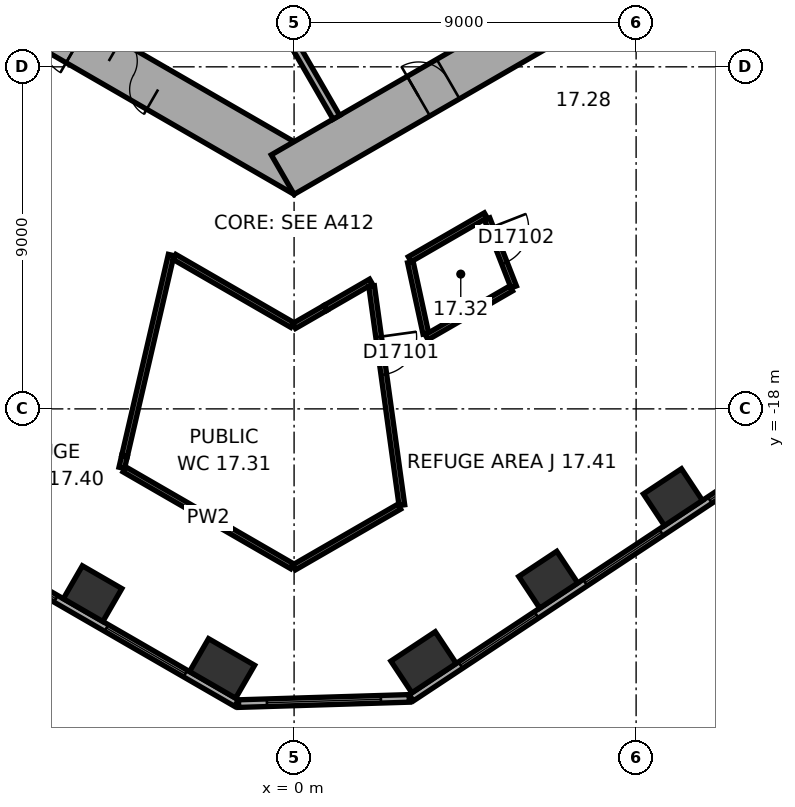
"""IFC4 building model, lengths in metres.
Left out: names, types, materials, properties, quantities, classifications, styles, units other than length and angle.
Written with IfcOpenShell. Run it as: python <this file> out.ifc"""

import sys

from ifc_helpers import new_model, si_unit, direction, frame, frame_2d, origin, origin_2d, place, context, subcontext, project, spatial, rectangle, extrude, element, fill, save


model = new_model("IFC4")
c1 = context("Model", 3, precision=1e-05, world=origin(), true_north=direction((0.0, 1.0)))
c2 = subcontext(c1, "Body", "Model", "MODEL_VIEW")
j1 = project(units=[si_unit("LENGTHUNIT", "METRE"), si_unit("PLANEANGLEUNIT", "RADIAN")], contexts=[c1])
p1 = place(None, origin())
s1 = spatial("IfcSite", under=j1, at=p1, CompositionType="ELEMENT")
p2 = place(p1, origin())
s2 = spatial("IfcBuilding", under=s1, at=p2, CompositionType="ELEMENT")
p3 = place(p2, frame((0.0, 0.0, 77.0)))
s3 = spatial("IfcBuildingStorey", under=s2, at=p3, CompositionType="ELEMENT", Elevation=77.0)
p4 = place(p3, frame((-5.302, -22.862, 0.0), z_axis=(0.0, 0.0, 1.0), x_axis=(0.866025403784, -0.5, 0.0)))
e1 = element("IfcColumn", 1, at=p4, inside=s3, PredefinedType="COLUMN", context=c2, shape_type="SweptSolid", body=[
    extrude(rectangle(XDim=1.2, YDim=1.0, at=origin_2d()), origin(), (0.0, 0.0, 1.0), 6.6),
])
for number, where, z_axis, x_axis in (
    (2, (-1.895, -24.829, 0.0), (0.0, 0.0, 1.0), (0.866, -0.5, 0.0)),
    (3, (3.407, -24.667, 0.0), (0.0, 0.0, 1.0), (0.834, 0.552, 0.0)),
):
    element("IfcColumn", number, at=place(p3, frame(where, z_axis=z_axis, x_axis=x_axis)), inside=s3, PredefinedType="COLUMN", context=c2, shape_type="SweptSolid", body=[
        extrude(rectangle(XDim=1.4, YDim=1.0, at=origin_2d()), origin(), (0.0, 0.0, 1.0), 6.6),
    ])
for number, where, z_axis, x_axis in (
    (4, (6.688, -22.496, 0.0), (0.0, 0.0, 1.0), (0.834, 0.552, 0.0)),
    (5, (9.969, -20.324, 0.0), (0.0, 0.0, 1.0), (0.834, 0.552, 0.0)),
):
    element("IfcColumn", number, at=place(p3, frame(where, z_axis=z_axis, x_axis=x_axis)), inside=s3, PredefinedType="COLUMN", context=c2, shape_type="SweptSolid", body=[
        extrude(rectangle(XDim=1.2, YDim=1.0, at=origin_2d()), origin(), (0.0, 0.0, 1.0), 6.6),
    ])
p5 = place(p3, frame((-10.4, -5.658, 0.0), z_axis=(0.0, 0.0, 1.0), x_axis=(0.866021384402, -0.500006961711, 0.0)))
e6 = element("IfcWall", 6, at=p5, inside=s3, PredefinedType="SHEAR", context=c2, shape_type="SweptSolid", body=[
    extrude(rectangle(XDim=12.355, YDim=1.2, at=frame_2d((6.178, 0.0))), origin(), (0.0, 0.0, 1.0), 6.6),
])
p6 = place(p5, frame((6.378, 0.0, 0.0)))
e7 = element("IfcOpeningElement", 7, at=p6, cuts=e6, PredefinedType="OPENING", context=c2, shape_type="SweptSolid", body=[
    extrude(rectangle(XDim=1.5, YDim=2.1, at=frame_2d((0.75, 1.05))), frame((0.0, 0.61, 0.0), z_axis=(0.0, -1.0, 0.0), x_axis=(1.0, 0.0, 0.0)), (0.0, 0.0, 1.0), 1.22),
])
p7 = place(p5, frame((1.928, 0.0, 0.0)))
e8 = element("IfcOpeningElement", 8, at=p7, cuts=e6, PredefinedType="OPENING", context=c2, shape_type="SweptSolid", body=[
    extrude(rectangle(XDim=0.9, YDim=2.1, at=frame_2d((0.45, 1.05))), frame((0.0, 0.61, 0.0), z_axis=(0.0, -1.0, 0.0), x_axis=(1.0, 0.0, 0.0)), (0.0, 0.0, 1.0), 1.22),
])
p8 = place(p5, frame((4.528, 0.0, 0.0)))
e9 = element("IfcOpeningElement", 9, at=p8, cuts=e6, PredefinedType="OPENING", context=c2, shape_type="SweptSolid", body=[
    extrude(rectangle(XDim=0.9, YDim=2.1, at=frame_2d((0.45, 1.05))), frame((0.0, 0.61, 0.0), z_axis=(0.0, -1.0, 0.0), x_axis=(1.0, 0.0, 0.0)), (0.0, 0.0, 1.0), 1.22),
])
p9 = place(p3, frame((-0.3, -11.836, 0.0), z_axis=(0.0, 0.0, 1.0), x_axis=(0.866021384402, 0.500006961711, 0.0)))
e10 = element("IfcWall", 10, at=p9, inside=s3, PredefinedType="SHEAR", context=c2, shape_type="SweptSolid", body=[
    extrude(rectangle(XDim=12.355, YDim=1.2, at=frame_2d((6.178, 0.0))), origin(), (0.0, 0.0, 1.0), 6.6),
])
p10 = place(p9, frame((4.128, 0.0, 0.0)))
e11 = element("IfcOpeningElement", 11, at=p10, cuts=e10, PredefinedType="OPENING", context=c2, shape_type="SweptSolid", body=[
    extrude(rectangle(XDim=0.9, YDim=2.1, at=frame_2d((0.45, 1.05))), frame((0.0, 0.61, 0.0), z_axis=(0.0, -1.0, 0.0), x_axis=(1.0, 0.0, 0.0)), (0.0, 0.0, 1.0), 1.22),
])
p11 = place(p9, frame((7.928, 0.0, 0.0)))
e12 = element("IfcOpeningElement", 12, at=p11, cuts=e10, PredefinedType="OPENING", context=c2, shape_type="SweptSolid", body=[
    extrude(rectangle(XDim=1.1, YDim=2.1, at=frame_2d((0.55, 1.05))), frame((0.0, 0.61, 0.0), z_axis=(0.0, -1.0, 0.0), x_axis=(1.0, 0.0, 0.0)), (0.0, 0.0, 1.0), 1.22),
])
p12 = place(p3, frame((-19.914, -15.119, 0.0), z_axis=(0.0, 0.0, 1.0), x_axis=(0.866025418898, -0.499999973822, 0.0)))
e13 = element("IfcWall", 13, at=p12, inside=s3, PredefinedType="STANDARD", context=c2, shape_type="SweptSolid", body=[
    extrude(rectangle(XDim=21.246, YDim=0.2, at=frame_2d((10.623, 0.0))), origin(), (0.0, 0.0, 1.0), 6.6),
])
p13 = place(p12, frame((1.555, 0.0, 0.8)))
e14 = element("IfcOpeningElement", 14, at=p13, cuts=e13, PredefinedType="OPENING", context=c2, shape_type="SweptSolid", body=[
    extrude(rectangle(XDim=2.4, YDim=4.2, at=frame_2d((1.2, 2.1))), frame((0.0, 0.11, 0.0), z_axis=(0.0, -1.0, 0.0), x_axis=(1.0, 0.0, 0.0)), (0.0, 0.0, 1.0), 0.22),
])
p14 = place(p12, frame((5.489, 0.0, 0.8)))
e15 = element("IfcOpeningElement", 15, at=p14, cuts=e13, PredefinedType="OPENING", context=c2, shape_type="SweptSolid", body=[
    extrude(rectangle(XDim=2.4, YDim=4.2, at=frame_2d((1.2, 2.1))), frame((0.0, 0.11, 0.0), z_axis=(0.0, -1.0, 0.0), x_axis=(1.0, 0.0, 0.0)), (0.0, 0.0, 1.0), 0.22),
])
p15 = place(p12, frame((9.424, 0.0, 0.8)))
e16 = element("IfcOpeningElement", 16, at=p15, cuts=e13, PredefinedType="OPENING", context=c2, shape_type="SweptSolid", body=[
    extrude(rectangle(XDim=2.4, YDim=4.2, at=frame_2d((1.2, 2.1))), frame((0.0, 0.11, 0.0), z_axis=(0.0, -1.0, 0.0), x_axis=(1.0, 0.0, 0.0)), (0.0, 0.0, 1.0), 0.22),
])
p16 = place(p12, frame((13.358, 0.0, 0.8)))
e17 = element("IfcOpeningElement", 17, at=p16, cuts=e13, PredefinedType="OPENING", context=c2, shape_type="SweptSolid", body=[
    extrude(rectangle(XDim=2.4, YDim=4.2, at=frame_2d((1.2, 2.1))), frame((0.0, 0.11, 0.0), z_axis=(0.0, -1.0, 0.0), x_axis=(1.0, 0.0, 0.0)), (0.0, 0.0, 1.0), 0.22),
])
p17 = place(p12, frame((17.293, 0.0, 0.8)))
e18 = element("IfcOpeningElement", 18, at=p17, cuts=e13, PredefinedType="OPENING", context=c2, shape_type="SweptSolid", body=[
    extrude(rectangle(XDim=2.4, YDim=4.2, at=frame_2d((1.2, 2.1))), frame((0.0, 0.11, 0.0), z_axis=(0.0, -1.0, 0.0), x_axis=(1.0, 0.0, 0.0)), (0.0, 0.0, 1.0), 0.22),
])
p18 = place(p3, frame((-1.461, -25.755, 0.0), z_axis=(0.0, 0.0, 1.0), x_axis=(0.999533823446, 0.030530898895, 0.0)))
e19 = element("IfcWall", 19, at=p18, inside=s3, PredefinedType="STANDARD", context=c2, shape_type="SweptSolid", body=[
    extrude(rectangle(XDim=4.494, YDim=0.2, at=frame_2d((2.247, 0.0))), origin(), (0.0, 0.0, 1.0), 6.6),
])
p19 = place(p18, frame((0.747, 0.0, 0.8)))
e20 = element("IfcOpeningElement", 20, at=p19, cuts=e19, PredefinedType="OPENING", context=c2, shape_type="SweptSolid", body=[
    extrude(rectangle(XDim=3.0, YDim=4.2, at=frame_2d((1.5, 2.1))), frame((0.0, 0.11, 0.0), z_axis=(0.0, -1.0, 0.0), x_axis=(1.0, 0.0, 0.0)), (0.0, 0.0, 1.0), 0.22),
])
p20 = place(p3, frame((3.083, -25.601, 0.0), z_axis=(0.0, 0.0, 1.0), x_axis=(0.833884295743, 0.551939291329, 0.0)))
e21 = element("IfcWall", 21, at=p20, inside=s3, PredefinedType="STANDARD", context=c2, shape_type="SweptSolid", body=[
    extrude(rectangle(XDim=21.246, YDim=0.2, at=frame_2d((10.623, 0.0))), origin(), (0.0, 0.0, 1.0), 6.6),
])
p21 = place(p20, frame((1.553, 0.0, 0.8)))
e22 = element("IfcOpeningElement", 22, at=p21, cuts=e21, PredefinedType="OPENING", context=c2, shape_type="SweptSolid", body=[
    extrude(rectangle(XDim=2.4, YDim=4.2, at=frame_2d((1.2, 2.1))), frame((0.0, 0.11, 0.0), z_axis=(0.0, -1.0, 0.0), x_axis=(1.0, 0.0, 0.0)), (0.0, 0.0, 1.0), 0.22),
])
p22 = place(p20, frame((5.488, 0.0, 0.8)))
e23 = element("IfcOpeningElement", 23, at=p22, cuts=e21, PredefinedType="OPENING", context=c2, shape_type="SweptSolid", body=[
    extrude(rectangle(XDim=2.4, YDim=4.2, at=frame_2d((1.2, 2.1))), frame((0.0, 0.11, 0.0), z_axis=(0.0, -1.0, 0.0), x_axis=(1.0, 0.0, 0.0)), (0.0, 0.0, 1.0), 0.22),
])
p23 = place(p20, frame((9.422, 0.0, 0.8)))
e24 = element("IfcOpeningElement", 24, at=p23, cuts=e21, PredefinedType="OPENING", context=c2, shape_type="SweptSolid", body=[
    extrude(rectangle(XDim=2.4, YDim=4.2, at=frame_2d((1.2, 2.1))), frame((0.0, 0.11, 0.0), z_axis=(0.0, -1.0, 0.0), x_axis=(1.0, 0.0, 0.0)), (0.0, 0.0, 1.0), 0.22),
])
p24 = place(p20, frame((13.357, 0.0, 0.8)))
e25 = element("IfcOpeningElement", 25, at=p24, cuts=e21, PredefinedType="OPENING", context=c2, shape_type="SweptSolid", body=[
    extrude(rectangle(XDim=2.4, YDim=4.2, at=frame_2d((1.2, 2.1))), frame((0.0, 0.11, 0.0), z_axis=(0.0, -1.0, 0.0), x_axis=(1.0, 0.0, 0.0)), (0.0, 0.0, 1.0), 0.22),
])
p25 = place(p20, frame((17.291, 0.0, 0.8)))
e26 = element("IfcOpeningElement", 26, at=p25, cuts=e21, PredefinedType="OPENING", context=c2, shape_type="SweptSolid", body=[
    extrude(rectangle(XDim=2.4, YDim=4.2, at=frame_2d((1.2, 2.1))), frame((0.0, 0.11, 0.0), z_axis=(0.0, -1.0, 0.0), x_axis=(1.0, 0.0, 0.0)), (0.0, 0.0, 1.0), 0.22),
])
p26 = place(p3, frame((-0.024, -8.559, 0.0), z_axis=(0.0, 0.0, 1.0), x_axis=(0.866026010844, 0.49999894854, 0.0)))
e27 = element("IfcWall", 27, at=p26, inside=s3, PredefinedType="PARTITIONING", context=c2, shape_type="SweptSolid", body=[
    extrude(rectangle(XDim=8.0, YDim=0.2, at=frame_2d((4.0, 0.0))), origin(), (0.0, 0.0, 1.0), 6.35),
])
p27 = place(p3, frame((0.013, -8.422, 0.0), z_axis=(0.0, 0.0, 1.0), x_axis=(0.500077893725, -0.86598042715, 0.0)))
e28 = element("IfcWall", 28, at=p27, inside=s3, PredefinedType="PARTITIONING", context=c2, shape_type="SweptSolid", body=[
    extrude(rectangle(XDim=2.2, YDim=0.2, at=frame_2d((1.1, 0.0))), origin(), (0.0, 0.0, 1.0), 6.35),
])
p28 = place(p3, frame((-0.052, -22.14, 0.0), z_axis=(0.0, 0.0, 1.0), x_axis=(-0.865999697039, 0.500044522747, 0.0)))
e29 = element("IfcWall", 29, at=p28, inside=s3, PredefinedType="PARTITIONING", context=c2, shape_type="SweptSolid", body=[
    extrude(rectangle(XDim=5.096, YDim=0.15, at=frame_2d((2.548, 0.0))), origin(), (0.0, 0.0, 1.0), 6.35),
])
p29 = place(p3, frame((2.767, -20.573, 0.0), z_axis=(0.0, 0.0, 1.0), x_axis=(-0.866009957911, -0.500026752084, 0.0)))
e30 = element("IfcWall", 30, at=p29, inside=s3, PredefinedType="PARTITIONING", context=c2, shape_type="SweptSolid", body=[
    extrude(rectangle(XDim=3.195, YDim=0.15, at=frame_2d((1.597, 0.0))), origin(), (0.0, 0.0, 1.0), 6.35),
])
p30 = place(p3, frame((-4.461, -19.237, 0.0), z_axis=(0.0, 0.0, 1.0), x_axis=(-0.225465256554, -0.974251208923, 0.0)))
e31 = element("IfcWall", 31, at=p30, inside=s3, PredefinedType="PARTITIONING", context=c2, shape_type="SweptSolid", body=[
    extrude(rectangle(XDim=0.324, YDim=0.15, at=frame_2d((0.162, 0.0))), origin(), (0.0, 0.0, 1.0), 6.35),
])
p31 = place(p3, frame((-4.461, -19.237, 0.0), z_axis=(0.0, 0.0, 1.0), x_axis=(0.225940611302, 0.974141078163, 0.0)))
e32 = element("IfcWall", 32, at=p31, inside=s3, PredefinedType="PARTITIONING", context=c2, shape_type="SweptSolid", body=[
    extrude(rectangle(XDim=5.426, YDim=0.15, at=frame_2d((2.713, 0.0))), origin(), (0.0, 0.0, 1.0), 5.9),
])
p32 = place(p3, frame((3.466, -16.018, 0.0), z_axis=(0.0, 0.0, 1.0), x_axis=(-0.211638005679, 0.977348123522, 0.0)))
e33 = element("IfcWall", 33, at=p32, inside=s3, PredefinedType="PARTITIONING", context=c2, shape_type="SweptSolid", body=[
    extrude(rectangle(XDim=1.921, YDim=0.15, at=frame_2d((0.96, 0.0))), origin(), (0.0, 0.0, 1.0), 6.35),
])
p33 = place(p3, frame((0.0, -15.82, 0.0), z_axis=(0.0, 0.0, 1.0), x_axis=(0.866041454758, 0.499972197867, 0.0)))
e34 = element("IfcWall", 34, at=p33, inside=s3, PredefinedType="PARTITIONING", context=c2, shape_type="SweptSolid", body=[
    extrude(rectangle(XDim=0.959, YDim=0.15, at=frame_2d((0.479, 0.0))), origin(), (0.0, 0.0, 1.0), 6.35),
])
p34 = place(p3, frame((0.831, -15.34, 0.0), z_axis=(0.0, 0.0, 1.0), x_axis=(0.865866779111, 0.500274645401, 0.0)))
e35 = element("IfcWall", 35, at=p34, inside=s3, PredefinedType="PARTITIONING", context=c2, shape_type="SweptSolid", body=[
    extrude(rectangle(XDim=1.378, YDim=0.15, at=frame_2d((0.689, 0.0))), origin(), (0.0, 0.0, 1.0), 6.35),
])
p35 = place(p3, frame((5.711, -14.832, 0.0), z_axis=(0.0, 0.0, 1.0), x_axis=(-0.86603988112, -0.499974923682, 0.0)))
e36 = element("IfcWall", 36, at=p35, inside=s3, PredefinedType="PARTITIONING", context=c2, shape_type="SweptSolid", body=[
    extrude(rectangle(XDim=2.567, YDim=0.15, at=frame_2d((1.284, 0.0))), origin(), (0.0, 0.0, 1.0), 6.35),
])
p36 = place(p3, frame((2.04, -14.77, 0.0), z_axis=(0.0, 0.0, 1.0), x_axis=(0.136802116784, -0.990598395337, 0.0)))
e37 = element("IfcWall", 37, at=p36, inside=s3, PredefinedType="PARTITIONING", context=c2, shape_type="SweptSolid", body=[
    extrude(rectangle(XDim=5.818, YDim=0.15, at=frame_2d((2.909, 0.0))), origin(), (0.0, 0.0, 1.0), 5.9),
])
p37 = place(p36, frame((1.35, 0.0, 0.0)))
e38 = element("IfcOpeningElement", 38, at=p37, cuts=e37, PredefinedType="OPENING", context=c2, shape_type="SweptSolid", body=[
    extrude(rectangle(XDim=1.0, YDim=2.1, at=frame_2d((0.5, 1.05))), frame((0.0, 0.085, 0.0), z_axis=(0.0, -1.0, 0.0), x_axis=(1.0, 0.0, 0.0)), (0.0, 0.0, 1.0), 0.17),
])
p38 = place(p3, frame((3.043, -14.062, 0.0), z_axis=(0.0, 0.0, 1.0), x_axis=(0.866016621662, 0.500015210774, 0.0)))
e39 = element("IfcWall", 39, at=p38, inside=s3, PredefinedType="PARTITIONING", context=c2, shape_type="SweptSolid", body=[
    extrude(rectangle(XDim=2.31, YDim=0.15, at=frame_2d((1.155, 0.0))), origin(), (0.0, 0.0, 1.0), 6.35),
])
p39 = place(p3, frame((-3.149, -14.001, 0.0), z_axis=(0.0, 0.0, 1.0), x_axis=(0.866016185111, -0.500015966871, 0.0)))
e40 = element("IfcWall", 40, at=p39, inside=s3, PredefinedType="PARTITIONING", context=c2, shape_type="SweptSolid", body=[
    extrude(rectangle(XDim=3.576, YDim=0.15, at=frame_2d((1.788, 0.0))), origin(), (0.0, 0.0, 1.0), 6.35),
])
p40 = place(p3, frame((5.08, -13.001, 0.0), z_axis=(0.0, 0.0, 1.0), x_axis=(0.364069068896, -0.931371952054, 0.0)))
e41 = element("IfcWall", 41, at=p40, inside=s3, PredefinedType="PARTITIONING", context=c2, shape_type="SweptSolid", body=[
    extrude(rectangle(XDim=1.923, YDim=0.15, at=frame_2d((0.962, 0.0))), origin(), (0.0, 0.0, 1.0), 6.35),
])
p41 = place(p40, frame((0.25, 0.0, 0.0)))
e42 = element("IfcOpeningElement", 42, at=p41, cuts=e41, PredefinedType="OPENING", context=c2, shape_type="SweptSolid", body=[
    extrude(rectangle(XDim=1.0, YDim=2.1, at=frame_2d((0.5, 1.05))), frame((0.0, 0.085, 0.0), z_axis=(0.0, -1.0, 0.0), x_axis=(1.0, 0.0, 0.0)), (0.0, 0.0, 1.0), 0.17),
])
p42 = place(p16, origin())
e43 = element("IfcWindow", 43, at=p42, inside=s3, PartitioningType="SINGLE_PANEL", PredefinedType="WINDOW", context=c2, shape_type="SweptSolid", body=[
    extrude(rectangle(XDim=2.4, YDim=4.2, at=frame_2d((1.2, 2.1))), frame((0.0, 0.03, 0.0), z_axis=(0.0, -1.0, 0.0), x_axis=(1.0, 0.0, 0.0)), (0.0, 0.0, 1.0), 0.06),
])
fill(e17, e43)
p43 = place(p17, origin())
e44 = element("IfcWindow", 44, at=p43, inside=s3, PartitioningType="SINGLE_PANEL", PredefinedType="WINDOW", context=c2, shape_type="SweptSolid", body=[
    extrude(rectangle(XDim=2.4, YDim=4.2, at=frame_2d((1.2, 2.1))), frame((0.0, 0.03, 0.0), z_axis=(0.0, -1.0, 0.0), x_axis=(1.0, 0.0, 0.0)), (0.0, 0.0, 1.0), 0.06),
])
fill(e18, e44)
p44 = place(p19, origin())
e45 = element("IfcWindow", 45, at=p44, inside=s3, PartitioningType="SINGLE_PANEL", PredefinedType="WINDOW", context=c2, shape_type="SweptSolid", body=[
    extrude(rectangle(XDim=3.0, YDim=4.2, at=frame_2d((1.5, 2.1))), frame((0.0, 0.03, 0.0), z_axis=(0.0, -1.0, 0.0), x_axis=(1.0, 0.0, 0.0)), (0.0, 0.0, 1.0), 0.06),
])
fill(e20, e45)
p45 = place(p21, origin())
e46 = element("IfcWindow", 46, at=p45, inside=s3, PartitioningType="SINGLE_PANEL", PredefinedType="WINDOW", context=c2, shape_type="SweptSolid", body=[
    extrude(rectangle(XDim=2.4, YDim=4.2, at=frame_2d((1.2, 2.1))), frame((0.0, 0.03, 0.0), z_axis=(0.0, -1.0, 0.0), x_axis=(1.0, 0.0, 0.0)), (0.0, 0.0, 1.0), 0.06),
])
fill(e22, e46)
p46 = place(p22, origin())
e47 = element("IfcWindow", 47, at=p46, inside=s3, PartitioningType="SINGLE_PANEL", PredefinedType="WINDOW", context=c2, shape_type="SweptSolid", body=[
    extrude(rectangle(XDim=2.4, YDim=4.2, at=frame_2d((1.2, 2.1))), frame((0.0, 0.03, 0.0), z_axis=(0.0, -1.0, 0.0), x_axis=(1.0, 0.0, 0.0)), (0.0, 0.0, 1.0), 0.06),
])
fill(e23, e47)
p47 = place(p23, origin())
e48 = element("IfcWindow", 48, at=p47, inside=s3, PartitioningType="SINGLE_PANEL", PredefinedType="WINDOW", context=c2, shape_type="SweptSolid", body=[
    extrude(rectangle(XDim=2.4, YDim=4.2, at=frame_2d((1.2, 2.1))), frame((0.0, 0.03, 0.0), z_axis=(0.0, -1.0, 0.0), x_axis=(1.0, 0.0, 0.0)), (0.0, 0.0, 1.0), 0.06),
])
fill(e24, e48)
p48 = place(p6, origin())
e49 = element("IfcDoor", 49, at=p48, inside=s3, OperationType="DOUBLE_DOOR_SINGLE_SWING", PredefinedType="DOOR", context=c2, shape_type="SweptSolid", body=[
    extrude(rectangle(XDim=1.5, YDim=2.1, at=frame_2d((0.75, 1.05))), frame((0.0, 0.025, 0.0), z_axis=(0.0, -1.0, 0.0), x_axis=(1.0, 0.0, 0.0)), (0.0, 0.0, 1.0), 0.05),
])
fill(e7, e49)
p49 = place(p10, origin())
e50 = element("IfcDoor", 50, at=p49, inside=s3, OperationType="SINGLE_SWING_LEFT", PredefinedType="DOOR", context=c2, shape_type="SweptSolid", body=[
    extrude(rectangle(XDim=0.9, YDim=2.1, at=frame_2d((0.45, 1.05))), frame((0.0, 0.025, 0.0), z_axis=(0.0, -1.0, 0.0), x_axis=(1.0, 0.0, 0.0)), (0.0, 0.0, 1.0), 0.05),
])
fill(e11, e50)
p50 = place(p37, origin())
e51 = element("IfcDoor", 51, at=p50, inside=s3, OperationType="SINGLE_SWING_LEFT", PredefinedType="DOOR", context=c2, shape_type="SweptSolid", body=[
    extrude(rectangle(XDim=1.0, YDim=2.1, at=frame_2d((0.5, 1.05))), frame((0.0, 0.025, 0.0), z_axis=(0.0, -1.0, 0.0), x_axis=(1.0, 0.0, 0.0)), (0.0, 0.0, 1.0), 0.05),
])
fill(e38, e51)
p51 = place(p41, origin())
e52 = element("IfcDoor", 52, at=p51, inside=s3, OperationType="SINGLE_SWING_LEFT", PredefinedType="DOOR", context=c2, shape_type="SweptSolid", body=[
    extrude(rectangle(XDim=1.0, YDim=2.1, at=frame_2d((0.5, 1.05))), frame((0.0, 0.025, 0.0), z_axis=(0.0, -1.0, 0.0), x_axis=(1.0, 0.0, 0.0)), (0.0, 0.0, 1.0), 0.05),
])
fill(e42, e52)
save(model, sys.argv[1])
